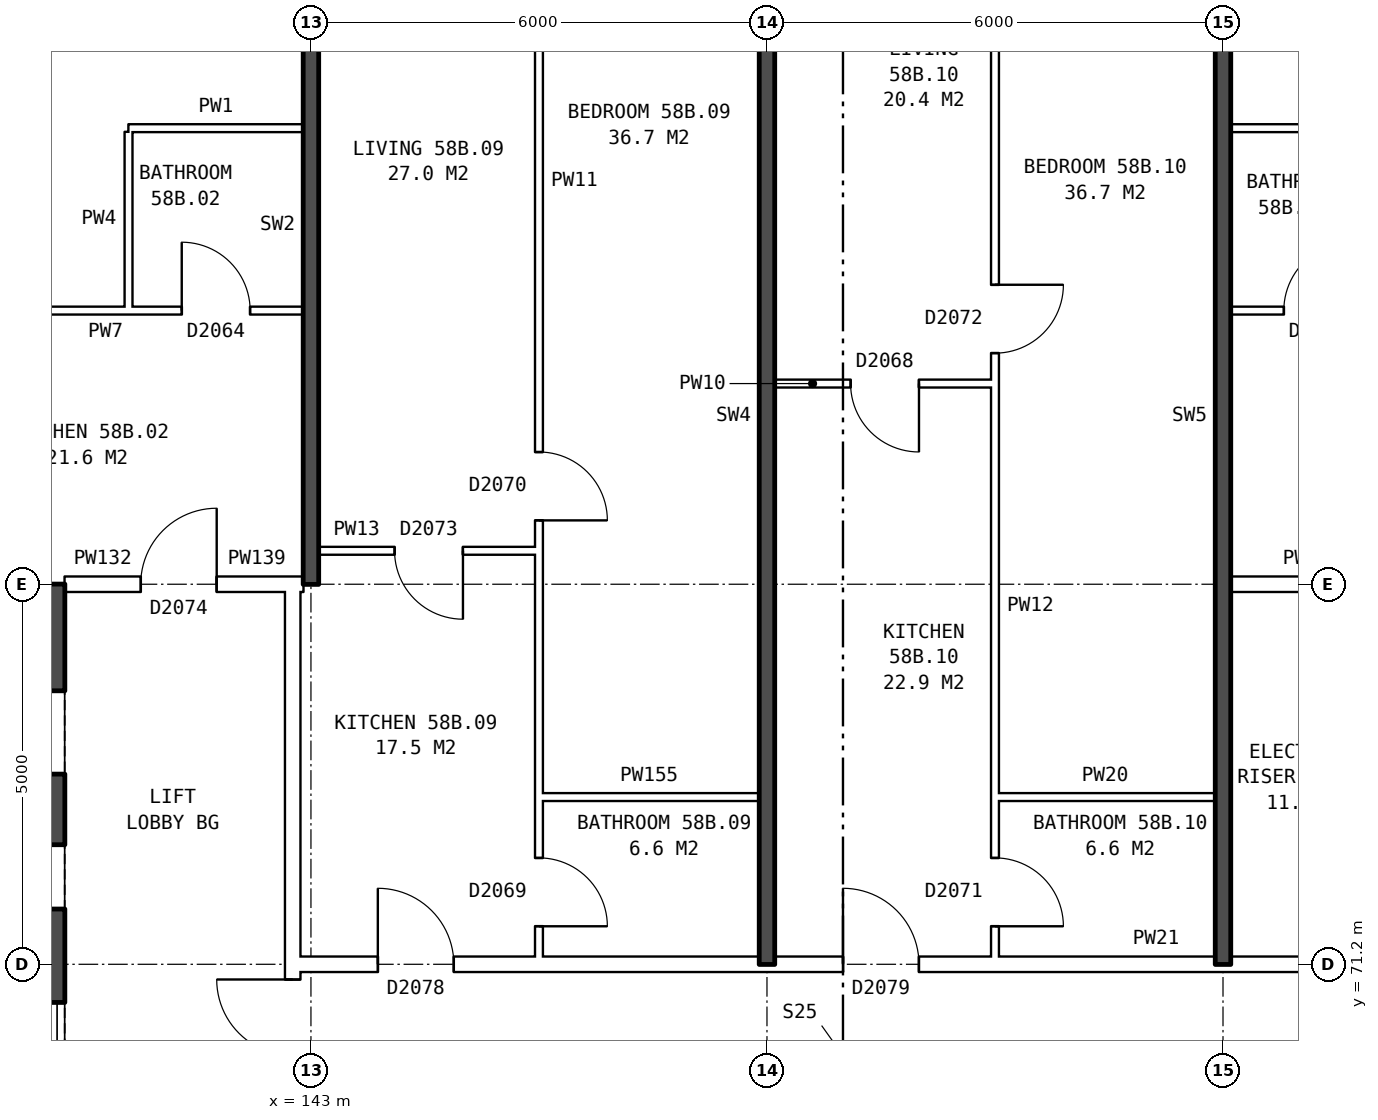
"""IFC4 building model, lengths in metres.
Left out: names, types, materials, properties, quantities, classifications, styles, units other than length and angle.
Written with IfcOpenShell. Run it as: python <this file> out.ifc"""

import sys

from ifc_helpers import new_model, si_unit, direction, frame, frame_2d, origin, place, context, subcontext, project, spatial, rectangle, extrude, element, fill, save


model = new_model("IFC4")
c1 = context("Model", 3, precision=1e-05, world=origin(), true_north=direction((0.0, 1.0)))
c2 = subcontext(c1, "Body", "Model", "MODEL_VIEW")
j1 = project(units=[si_unit("LENGTHUNIT", "METRE"), si_unit("PLANEANGLEUNIT", "RADIAN")], contexts=[c1])
p1 = place(None, origin())
s1 = spatial("IfcSite", under=j1, at=p1, CompositionType="ELEMENT")
p2 = place(p1, origin())
s2 = spatial("IfcBuilding", under=s1, at=p2, CompositionType="ELEMENT")
p3 = place(p2, frame((0.0, 0.0, 205.9)))
s3 = spatial("IfcBuildingStorey", under=s2, at=p3, CompositionType="ELEMENT", Elevation=205.9)
p4 = place(p3, frame((139.56, 63.8, 0.0), z_axis=(0.0, 0.0, 1.0), x_axis=(0.0, 1.0, 0.0)))
e1 = element("IfcWall", 1, at=p4, inside=s3, PredefinedType="SHEAR", context=c2, shape_type="SweptSolid", body=[
    extrude(rectangle(XDim=12.4, YDim=0.4, at=frame_2d((6.2, 0.0))), origin(), (0.0, 0.0, 1.0), 2.85),
])
p5 = place(p4, frame((1.325, 0.0, 0.0)))
e2 = element("IfcOpeningElement", 2, at=p5, cuts=e1, PredefinedType="OPENING", context=c2, shape_type="SweptSolid", body=[
    extrude(rectangle(XDim=1.1, YDim=2.1, at=frame_2d((0.55, 1.05))), frame((0.0, 0.21, 0.0), z_axis=(0.0, -1.0, 0.0), x_axis=(1.0, 0.0, 0.0)), (0.0, 0.0, 1.0), 0.42),
])
p6 = place(p4, frame((3.6, 0.0, 0.0)))
e3 = element("IfcOpeningElement", 3, at=p6, cuts=e1, PredefinedType="OPENING", context=c2, shape_type="SweptSolid", body=[
    extrude(rectangle(XDim=1.1, YDim=2.1, at=frame_2d((0.55, 1.05))), frame((0.0, 0.21, 0.0), z_axis=(0.0, -1.0, 0.0), x_axis=(1.0, 0.0, 0.0)), (0.0, 0.0, 1.0), 0.42),
])
p7 = place(p4, frame((5.8, 0.0, 0.0)))
e4 = element("IfcOpeningElement", 4, at=p7, cuts=e1, PredefinedType="OPENING", context=c2, shape_type="SweptSolid", body=[
    extrude(rectangle(XDim=1.1, YDim=2.1, at=frame_2d((0.55, 1.05))), frame((0.0, 0.21, 0.0), z_axis=(0.0, -1.0, 0.0), x_axis=(1.0, 0.0, 0.0)), (0.0, 0.0, 1.0), 0.42),
])
p8 = place(p4, frame((9.9, 0.0, 0.0)))
e5 = element("IfcOpeningElement", 5, at=p8, cuts=e1, PredefinedType="OPENING", context=c2, shape_type="SweptSolid", body=[
    extrude(rectangle(XDim=1.1, YDim=2.1, at=frame_2d((0.55, 1.05))), frame((0.0, 0.21, 0.0), z_axis=(0.0, -1.0, 0.0), x_axis=(1.0, 0.0, 0.0)), (0.0, 0.0, 1.0), 0.42),
])
p9 = place(p4, frame((8.125, 0.0, 0.0)))
e6 = element("IfcOpeningElement", 6, at=p9, cuts=e1, PredefinedType="OPENING", context=c2, shape_type="SweptSolid", body=[
    extrude(rectangle(XDim=0.85, YDim=2.1, at=frame_2d((0.425, 1.05))), frame((0.0, 0.21, 0.0), z_axis=(0.0, -1.0, 0.0), x_axis=(1.0, 0.0, 0.0)), (0.0, 0.0, 1.0), 0.42),
])
p10 = place(p3, frame((142.76, 63.9, 0.0), z_axis=(0.0, 0.0, 1.0), x_axis=(0.0, 1.0, 0.0)))
e7 = element("IfcWall", 7, at=p10, inside=s3, PredefinedType="PARTITIONING", context=c2, shape_type="SweptSolid", body=[
    extrude(rectangle(XDim=12.2, YDim=0.2, at=frame_2d((6.1, 0.0))), origin(), (0.0, 0.0, 1.0), 2.85),
])
p11 = place(p10, frame((5.1, 0.0, 0.0)))
e8 = element("IfcOpeningElement", 8, at=p11, cuts=e7, PredefinedType="OPENING", context=c2, shape_type="SweptSolid", body=[
    extrude(rectangle(XDim=2.0, YDim=2.1, at=frame_2d((1.0, 1.05))), frame((0.0, 0.11, 0.0), z_axis=(0.0, -1.0, 0.0), x_axis=(1.0, 0.0, 0.0)), (0.0, 0.0, 1.0), 0.22),
])
p12 = place(p3, frame((142.76, 71.2, 0.0), z_axis=(0.0, 0.0, 1.0), x_axis=(1.0, 0.0, 0.0)))
e9 = element("IfcWall", 9, at=p12, inside=s3, PredefinedType="PARTITIONING", context=c2, shape_type="SweptSolid", body=[
    extrude(rectangle(XDim=14.48, YDim=0.2, at=frame_2d((7.24, 0.0))), origin(), (0.0, 0.0, 1.0), 2.85),
])
p13 = place(p12, frame((1.12, 0.0, 0.0)))
e10 = element("IfcOpeningElement", 10, at=p13, cuts=e9, PredefinedType="OPENING", context=c2, shape_type="SweptSolid", body=[
    extrude(rectangle(XDim=1.0, YDim=2.1, at=frame_2d((0.5, 1.05))), frame((0.0, 0.11, 0.0), z_axis=(0.0, -1.0, 0.0), x_axis=(1.0, 0.0, 0.0)), (0.0, 0.0, 1.0), 0.22),
])
p14 = place(p12, frame((7.24, 0.0, 0.0)))
e11 = element("IfcOpeningElement", 11, at=p14, cuts=e9, PredefinedType="OPENING", context=c2, shape_type="SweptSolid", body=[
    extrude(rectangle(XDim=1.0, YDim=2.1, at=frame_2d((0.5, 1.05))), frame((0.0, 0.11, 0.0), z_axis=(0.0, -1.0, 0.0), x_axis=(1.0, 0.0, 0.0)), (0.0, 0.0, 1.0), 0.22),
])
for number, where, z_axis, x_axis in (
    (12, (146.0, 73.4, 0.0), (0.0, 0.0, 1.0), (1.0, 0.0, 0.0)),
    (13, (152.0, 73.4, 0.0), (0.0, 0.0, 1.0), (1.0, 0.0, 0.0)),
):
    element("IfcWall", number, at=place(p3, frame(where, z_axis=z_axis, x_axis=x_axis)), inside=s3, PredefinedType="PARTITIONING", context=c2, shape_type="SweptSolid", body=[
        extrude(rectangle(XDim=2.9, YDim=0.1, at=frame_2d((1.45, 0.0))), origin(), (0.0, 0.0, 1.0), 2.85),
    ])
p15 = place(p3, frame((139.76, 76.2, 0.0), z_axis=(0.0, 0.0, 1.0), x_axis=(1.0, 0.0, 0.0)))
e14 = element("IfcWall", 14, at=p15, inside=s3, PredefinedType="PARTITIONING", context=c2, shape_type="SweptSolid", body=[
    extrude(rectangle(XDim=3.0, YDim=0.2, at=frame_2d((1.5, 0.0))), origin(), (0.0, 0.0, 1.0), 2.85),
])
p16 = place(p15, frame((1.0, 0.0, 0.0)))
e15 = element("IfcOpeningElement", 15, at=p16, cuts=e14, PredefinedType="OPENING", context=c2, shape_type="SweptSolid", body=[
    extrude(rectangle(XDim=1.0, YDim=2.1, at=frame_2d((0.5, 1.05))), frame((0.0, 0.11, 0.0), z_axis=(0.0, -1.0, 0.0), x_axis=(1.0, 0.0, 0.0)), (0.0, 0.0, 1.0), 0.22),
])
p17 = place(p3, frame((142.76, 76.2, 0.0), z_axis=(0.0, 0.0, 1.0), x_axis=(1.0, 0.0, 0.0)))
e16 = element("IfcWall", 16, at=p17, inside=s3, PredefinedType="PARTITIONING", context=c2, shape_type="SweptSolid", body=[
    extrude(rectangle(XDim=0.14, YDim=0.2, at=frame_2d((0.07, 0.0))), origin(), (0.0, 0.0, 1.0), 2.85),
])
p18 = place(p3, frame((155.1, 76.2, 0.0), z_axis=(0.0, 0.0, 1.0), x_axis=(1.0, 0.0, 0.0)))
e17 = element("IfcWall", 17, at=p18, inside=s3, PredefinedType="PARTITIONING", context=c2, shape_type="SweptSolid", body=[
    extrude(rectangle(XDim=2.14, YDim=0.2, at=frame_2d((1.07, 0.0))), origin(), (0.0, 0.0, 1.0), 2.85),
])
p19 = place(p3, frame((143.1, 76.64, 0.0), z_axis=(0.0, 0.0, 1.0), x_axis=(1.0, 0.0, 0.0)))
e18 = element("IfcWall", 18, at=p19, inside=s3, PredefinedType="PARTITIONING", context=c2, shape_type="SweptSolid", body=[
    extrude(rectangle(XDim=2.9, YDim=0.1, at=frame_2d((1.45, 0.0))), origin(), (0.0, 0.0, 1.0), 2.85),
])
p20 = place(p19, frame((1.0, 0.0, 0.0)))
e19 = element("IfcOpeningElement", 19, at=p20, cuts=e18, PredefinedType="OPENING", context=c2, shape_type="SweptSolid", body=[
    extrude(rectangle(XDim=0.9, YDim=2.1, at=frame_2d((0.45, 1.05))), frame((0.0, 0.06, 0.0), z_axis=(0.0, -1.0, 0.0), x_axis=(1.0, 0.0, 0.0)), (0.0, 0.0, 1.0), 0.12),
])
p21 = place(p3, frame((149.1, 78.84, 0.0), z_axis=(0.0, 0.0, 1.0), x_axis=(1.0, 0.0, 0.0)))
e20 = element("IfcWall", 20, at=p21, inside=s3, PredefinedType="PARTITIONING", context=c2, shape_type="SweptSolid", body=[
    extrude(rectangle(XDim=2.9, YDim=0.1, at=frame_2d((1.45, 0.0))), origin(), (0.0, 0.0, 1.0), 2.85),
])
p22 = place(p21, frame((1.0, 0.0, 0.0)))
e21 = element("IfcOpeningElement", 21, at=p22, cuts=e20, PredefinedType="OPENING", context=c2, shape_type="SweptSolid", body=[
    extrude(rectangle(XDim=0.9, YDim=2.1, at=frame_2d((0.45, 1.05))), frame((0.0, 0.06, 0.0), z_axis=(0.0, -1.0, 0.0), x_axis=(1.0, 0.0, 0.0)), (0.0, 0.0, 1.0), 0.12),
])
p23 = place(p3, frame((137.1, 79.8, 0.0), z_axis=(0.0, 0.0, 1.0), x_axis=(1.0, 0.0, 0.0)))
e22 = element("IfcWall", 22, at=p23, inside=s3, PredefinedType="PARTITIONING", context=c2, shape_type="SweptSolid", body=[
    extrude(rectangle(XDim=5.8, YDim=0.1, at=frame_2d((2.9, 0.0))), origin(), (0.0, 0.0, 1.0), 2.85),
])
p24 = place(p23, frame((1.3, 0.0, 0.0)))
e23 = element("IfcOpeningElement", 23, at=p24, cuts=e22, PredefinedType="OPENING", context=c2, shape_type="SweptSolid", body=[
    extrude(rectangle(XDim=0.9, YDim=2.1, at=frame_2d((0.45, 1.05))), frame((0.0, 0.06, 0.0), z_axis=(0.0, -1.0, 0.0), x_axis=(1.0, 0.0, 0.0)), (0.0, 0.0, 1.0), 0.12),
])
p25 = place(p23, frame((4.2, 0.0, 0.0)))
e24 = element("IfcOpeningElement", 24, at=p25, cuts=e22, PredefinedType="OPENING", context=c2, shape_type="SweptSolid", body=[
    extrude(rectangle(XDim=0.9, YDim=2.1, at=frame_2d((0.45, 1.05))), frame((0.0, 0.06, 0.0), z_axis=(0.0, -1.0, 0.0), x_axis=(1.0, 0.0, 0.0)), (0.0, 0.0, 1.0), 0.12),
])
p26 = place(p3, frame((155.1, 79.8, 0.0), z_axis=(0.0, 0.0, 1.0), x_axis=(1.0, 0.0, 0.0)))
e25 = element("IfcWall", 25, at=p26, inside=s3, PredefinedType="PARTITIONING", context=c2, shape_type="SweptSolid", body=[
    extrude(rectangle(XDim=5.8, YDim=0.1, at=frame_2d((2.9, 0.0))), origin(), (0.0, 0.0, 1.0), 2.85),
])
p27 = place(p26, frame((3.6, 0.0, 0.0)))
e26 = element("IfcOpeningElement", 26, at=p27, cuts=e25, PredefinedType="OPENING", context=c2, shape_type="SweptSolid", body=[
    extrude(rectangle(XDim=0.9, YDim=2.1, at=frame_2d((0.45, 1.05))), frame((0.0, 0.06, 0.0), z_axis=(0.0, -1.0, 0.0), x_axis=(1.0, 0.0, 0.0)), (0.0, 0.0, 1.0), 0.12),
])
p28 = place(p26, frame((0.7, 0.0, 0.0)))
e27 = element("IfcOpeningElement", 27, at=p28, cuts=e25, PredefinedType="OPENING", context=c2, shape_type="SweptSolid", body=[
    extrude(rectangle(XDim=0.9, YDim=2.1, at=frame_2d((0.45, 1.05))), frame((0.0, 0.06, 0.0), z_axis=(0.0, -1.0, 0.0), x_axis=(1.0, 0.0, 0.0)), (0.0, 0.0, 1.0), 0.12),
])
for number, where, z_axis, x_axis in (
    (28, (140.6, 82.2, 0.0), (0.0, 0.0, 1.0), (1.0, 0.0, 0.0)),
    (29, (155.1, 82.2, 0.0), (0.0, 0.0, 1.0), (1.0, 0.0, 0.0)),
    (30, (140.6, 79.85, 0.0), (0.0, 0.0, 1.0), (0.0, 1.0, 0.0)),
):
    element("IfcWall", number, at=place(p3, frame(where, z_axis=z_axis, x_axis=x_axis)), inside=s3, PredefinedType="PARTITIONING", context=c2, shape_type="SweptSolid", body=[
        extrude(rectangle(XDim=2.3, YDim=0.1, at=frame_2d((1.15, 0.0))), origin(), (0.0, 0.0, 1.0), 2.85),
    ])
p29 = place(p3, frame((143.0, 76.2, 0.0), z_axis=(0.0, 0.0, 1.0), x_axis=(0.0, 1.0, 0.0)))
e31 = element("IfcWall", 31, at=p29, inside=s3, PredefinedType="SOLIDWALL", context=c2, shape_type="SweptSolid", body=[
    extrude(rectangle(XDim=9.44, YDim=0.2, at=frame_2d((4.72, 0.0))), origin(), (0.0, 0.0, 1.0), 2.85),
])
p30 = place(p3, frame((146.0, 71.3, 0.0), z_axis=(0.0, 0.0, 1.0), x_axis=(0.0, 1.0, 0.0)))
e32 = element("IfcWall", 32, at=p30, inside=s3, PredefinedType="PARTITIONING", context=c2, shape_type="SweptSolid", body=[
    extrude(rectangle(XDim=14.34, YDim=0.1, at=frame_2d((7.17, 0.0))), origin(), (0.0, 0.0, 1.0), 2.85),
])
p31 = place(p30, frame((5.74, 0.0, 0.0)))
e33 = element("IfcOpeningElement", 33, at=p31, cuts=e32, PredefinedType="OPENING", context=c2, shape_type="SweptSolid", body=[
    extrude(rectangle(XDim=0.9, YDim=2.1, at=frame_2d((0.45, 1.05))), frame((0.0, 0.06, 0.0), z_axis=(0.0, -1.0, 0.0), x_axis=(1.0, 0.0, 0.0)), (0.0, 0.0, 1.0), 0.12),
])
p32 = place(p30, frame((0.4, 0.0, 0.0)))
e34 = element("IfcOpeningElement", 34, at=p32, cuts=e32, PredefinedType="OPENING", context=c2, shape_type="SweptSolid", body=[
    extrude(rectangle(XDim=0.9, YDim=2.1, at=frame_2d((0.45, 1.05))), frame((0.0, 0.06, 0.0), z_axis=(0.0, -1.0, 0.0), x_axis=(1.0, 0.0, 0.0)), (0.0, 0.0, 1.0), 0.12),
])
p33 = place(p3, frame((149.0, 71.2, 0.0), z_axis=(0.0, 0.0, 1.0), x_axis=(0.0, 1.0, 0.0)))
e35 = element("IfcWall", 35, at=p33, inside=s3, PredefinedType="SOLIDWALL", context=c2, shape_type="SweptSolid", body=[
    extrude(rectangle(XDim=14.44, YDim=0.2, at=frame_2d((7.22, 0.0))), origin(), (0.0, 0.0, 1.0), 2.85),
])
p34 = place(p3, frame((152.0, 71.3, 0.0), z_axis=(0.0, 0.0, 1.0), x_axis=(0.0, 1.0, 0.0)))
e36 = element("IfcWall", 36, at=p34, inside=s3, PredefinedType="PARTITIONING", context=c2, shape_type="SweptSolid", body=[
    extrude(rectangle(XDim=14.34, YDim=0.1, at=frame_2d((7.17, 0.0))), origin(), (0.0, 0.0, 1.0), 2.85),
])
p35 = place(p34, frame((7.94, 0.0, 0.0)))
e37 = element("IfcOpeningElement", 37, at=p35, cuts=e36, PredefinedType="OPENING", context=c2, shape_type="SweptSolid", body=[
    extrude(rectangle(XDim=0.9, YDim=2.1, at=frame_2d((0.45, 1.05))), frame((0.0, 0.06, 0.0), z_axis=(0.0, -1.0, 0.0), x_axis=(1.0, 0.0, 0.0)), (0.0, 0.0, 1.0), 0.12),
])
p36 = place(p34, frame((0.4, 0.0, 0.0)))
e38 = element("IfcOpeningElement", 38, at=p36, cuts=e36, PredefinedType="OPENING", context=c2, shape_type="SweptSolid", body=[
    extrude(rectangle(XDim=0.9, YDim=2.1, at=frame_2d((0.45, 1.05))), frame((0.0, 0.06, 0.0), z_axis=(0.0, -1.0, 0.0), x_axis=(1.0, 0.0, 0.0)), (0.0, 0.0, 1.0), 0.12),
])
p37 = place(p3, frame((155.0, 71.2, 0.0), z_axis=(0.0, 0.0, 1.0), x_axis=(0.0, 1.0, 0.0)))
e39 = element("IfcWall", 39, at=p37, inside=s3, PredefinedType="SOLIDWALL", context=c2, shape_type="SweptSolid", body=[
    extrude(rectangle(XDim=14.44, YDim=0.2, at=frame_2d((7.22, 0.0))), origin(), (0.0, 0.0, 1.0), 2.85),
])
p38 = place(p11, origin())
e40 = element("IfcDoor", 40, at=p38, inside=s3, OperationType="DOUBLE_DOOR_SINGLE_SWING", PredefinedType="DOOR", context=c2, shape_type="SweptSolid", body=[
    extrude(rectangle(XDim=2.0, YDim=2.1, at=frame_2d((1.0, 1.05))), frame((0.0, 0.025, 0.0), z_axis=(0.0, -1.0, 0.0), x_axis=(1.0, 0.0, 0.0)), (0.0, 0.0, 1.0), 0.05),
])
fill(e8, e40)
p39 = place(p16, origin())
e41 = element("IfcDoor", 41, at=p39, inside=s3, OperationType="SINGLE_SWING_RIGHT", PredefinedType="DOOR", context=c2, shape_type="SweptSolid", body=[
    extrude(rectangle(XDim=1.0, YDim=2.1, at=frame_2d((0.5, 1.05))), frame((0.0, 0.025, 0.0), z_axis=(0.0, -1.0, 0.0), x_axis=(1.0, 0.0, 0.0)), (0.0, 0.0, 1.0), 0.05),
])
fill(e15, e41)
p40 = place(p25, origin())
e42 = element("IfcDoor", 42, at=p40, inside=s3, OperationType="SINGLE_SWING_LEFT", PredefinedType="DOOR", context=c2, shape_type="SweptSolid", body=[
    extrude(rectangle(XDim=0.9, YDim=2.1, at=frame_2d((0.45, 1.05))), frame((0.0, 0.025, 0.0), z_axis=(0.0, -1.0, 0.0), x_axis=(1.0, 0.0, 0.0)), (0.0, 0.0, 1.0), 0.05),
])
fill(e24, e42)
p41 = place(p28, origin())
e43 = element("IfcDoor", 43, at=p41, inside=s3, OperationType="SINGLE_SWING_RIGHT", PredefinedType="DOOR", context=c2, shape_type="SweptSolid", body=[
    extrude(rectangle(XDim=0.9, YDim=2.1, at=frame_2d((0.45, 1.05))), frame((0.0, 0.025, 0.0), z_axis=(0.0, -1.0, 0.0), x_axis=(1.0, 0.0, 0.0)), (0.0, 0.0, 1.0), 0.05),
])
fill(e27, e43)
p42 = place(p31, frame((0.9, 0.0, 0.0), z_axis=(0.0, 0.0, 1.0), x_axis=(-1.0, 0.0, 0.0)))
e44 = element("IfcDoor", 44, at=p42, inside=s3, OperationType="SINGLE_SWING_RIGHT", PredefinedType="DOOR", context=c2, shape_type="SweptSolid", body=[
    extrude(rectangle(XDim=0.9, YDim=2.1, at=frame_2d((0.45, 1.05))), frame((0.0, 0.025, 0.0), z_axis=(0.0, -1.0, 0.0), x_axis=(1.0, 0.0, 0.0)), (0.0, 0.0, 1.0), 0.05),
])
fill(e33, e44)
p43 = place(p13, origin())
e45 = element("IfcDoor", 45, at=p43, inside=s3, OperationType="SINGLE_SWING_LEFT", PredefinedType="DOOR", context=c2, shape_type="SweptSolid", body=[
    extrude(rectangle(XDim=1.0, YDim=2.1, at=frame_2d((0.5, 1.05))), frame((0.0, 0.025, 0.0), z_axis=(0.0, -1.0, 0.0), x_axis=(1.0, 0.0, 0.0)), (0.0, 0.0, 1.0), 0.05),
])
fill(e10, e45)
p44 = place(p20, frame((0.9, 0.0, 0.0), z_axis=(0.0, 0.0, 1.0), x_axis=(-1.0, 0.0, 0.0)))
e46 = element("IfcDoor", 46, at=p44, inside=s3, OperationType="SINGLE_SWING_LEFT", PredefinedType="DOOR", context=c2, shape_type="SweptSolid", body=[
    extrude(rectangle(XDim=0.9, YDim=2.1, at=frame_2d((0.45, 1.05))), frame((0.0, 0.025, 0.0), z_axis=(0.0, -1.0, 0.0), x_axis=(1.0, 0.0, 0.0)), (0.0, 0.0, 1.0), 0.05),
])
fill(e19, e46)
p45 = place(p32, frame((0.9, 0.0, 0.0), z_axis=(0.0, 0.0, 1.0), x_axis=(-1.0, 0.0, 0.0)))
e47 = element("IfcDoor", 47, at=p45, inside=s3, OperationType="SINGLE_SWING_RIGHT", PredefinedType="DOOR", context=c2, shape_type="SweptSolid", body=[
    extrude(rectangle(XDim=0.9, YDim=2.1, at=frame_2d((0.45, 1.05))), frame((0.0, 0.025, 0.0), z_axis=(0.0, -1.0, 0.0), x_axis=(1.0, 0.0, 0.0)), (0.0, 0.0, 1.0), 0.05),
])
fill(e34, e47)
p46 = place(p35, frame((0.9, 0.0, 0.0), z_axis=(0.0, 0.0, 1.0), x_axis=(-1.0, 0.0, 0.0)))
e48 = element("IfcDoor", 48, at=p46, inside=s3, OperationType="SINGLE_SWING_LEFT", PredefinedType="DOOR", context=c2, shape_type="SweptSolid", body=[
    extrude(rectangle(XDim=0.9, YDim=2.1, at=frame_2d((0.45, 1.05))), frame((0.0, 0.025, 0.0), z_axis=(0.0, -1.0, 0.0), x_axis=(1.0, 0.0, 0.0)), (0.0, 0.0, 1.0), 0.05),
])
fill(e37, e48)
p47 = place(p14, origin())
e49 = element("IfcDoor", 49, at=p47, inside=s3, OperationType="SINGLE_SWING_LEFT", PredefinedType="DOOR", context=c2, shape_type="SweptSolid", body=[
    extrude(rectangle(XDim=1.0, YDim=2.1, at=frame_2d((0.5, 1.05))), frame((0.0, 0.025, 0.0), z_axis=(0.0, -1.0, 0.0), x_axis=(1.0, 0.0, 0.0)), (0.0, 0.0, 1.0), 0.05),
])
fill(e11, e49)
p48 = place(p22, frame((0.9, 0.0, 0.0), z_axis=(0.0, 0.0, 1.0), x_axis=(-1.0, 0.0, 0.0)))
e50 = element("IfcDoor", 50, at=p48, inside=s3, OperationType="SINGLE_SWING_LEFT", PredefinedType="DOOR", context=c2, shape_type="SweptSolid", body=[
    extrude(rectangle(XDim=0.9, YDim=2.1, at=frame_2d((0.45, 1.05))), frame((0.0, 0.025, 0.0), z_axis=(0.0, -1.0, 0.0), x_axis=(1.0, 0.0, 0.0)), (0.0, 0.0, 1.0), 0.05),
])
fill(e21, e50)
p49 = place(p36, frame((0.9, 0.0, 0.0), z_axis=(0.0, 0.0, 1.0), x_axis=(-1.0, 0.0, 0.0)))
e51 = element("IfcDoor", 51, at=p49, inside=s3, OperationType="SINGLE_SWING_RIGHT", PredefinedType="DOOR", context=c2, shape_type="SweptSolid", body=[
    extrude(rectangle(XDim=0.9, YDim=2.1, at=frame_2d((0.45, 1.05))), frame((0.0, 0.025, 0.0), z_axis=(0.0, -1.0, 0.0), x_axis=(1.0, 0.0, 0.0)), (0.0, 0.0, 1.0), 0.05),
])
fill(e38, e51)
save(model, sys.argv[1])
